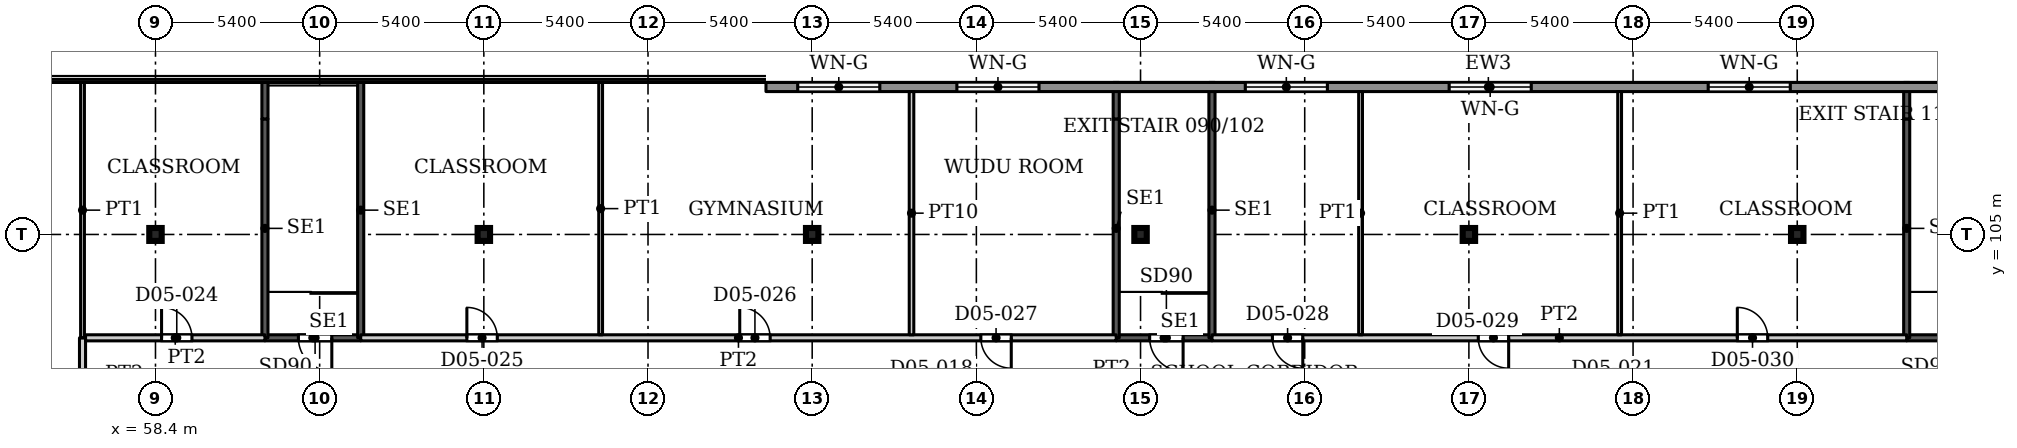
"""IFC4 building model, lengths in metres.
Left out: names, types, materials, properties, quantities, classifications, styles, units other than length and angle.
Written with IfcOpenShell. Run it as: python <this file> out.ifc"""

import sys

from ifc_helpers import new_model, si_unit, direction, frame, frame_2d, origin, origin_2d, place, context, subcontext, project, spatial, rectangle, i_section, extrude, source, transform, mapped, element, fill, save


model = new_model("IFC4")
c1 = context("Model", 3, precision=1e-05, world=origin(), true_north=direction((0.0, 1.0)))
c2 = subcontext(c1, "Body", "Model", "MODEL_VIEW")
j1 = project(units=[si_unit("LENGTHUNIT", "METRE"), si_unit("PLANEANGLEUNIT", "RADIAN")], contexts=[c1])
p1 = place(None, origin())
s1 = spatial("IfcSite", under=j1, at=p1, CompositionType="ELEMENT")
p2 = place(p1, origin())
s2 = spatial("IfcBuilding", under=s1, at=p2, CompositionType="ELEMENT")
p3 = place(p2, frame((0.0, 0.0, 26.0)))
s3 = spatial("IfcBuildingStorey", under=s2, at=p3, CompositionType="ELEMENT", Elevation=26.0)
for number, where, z_axis, x_axis in (
    (1, (58.4, 105.0, 0.0), (0.0, 0.0, 1.0), (1.0, 0.0, 0.0)),
    (2, (69.2, 105.0, 0.0), (0.0, 0.0, 1.0), (1.0, 0.0, 0.0)),
    (3, (80.0, 105.0, 0.0), (0.0, 0.0, 1.0), (1.0, 0.0, 0.0)),
    (4, (90.8, 105.0, 0.0), (0.0, 0.0, 1.0), (1.0, 0.0, 0.0)),
    (5, (101.6, 105.0, 0.0), (0.0, 0.0, 1.0), (1.0, 0.0, 0.0)),
    (6, (112.4, 105.0, 0.0), (0.0, 0.0, 1.0), (1.0, 0.0, 0.0)),
):
    element("IfcColumn", number, at=place(p3, frame(where, z_axis=z_axis, x_axis=x_axis)), inside=s3, PredefinedType="COLUMN", context=c2, shape_type="SweptSolid", body=[
        extrude(i_section(OverallWidth=0.409, OverallDepth=0.425, WebThickness=0.033, FlangeThickness=0.052, FilletRadius=0.013, at=origin_2d()), origin(), (0.0, 0.0, 1.0), 4.5),
    ])
p4 = place(p3, frame((78.48, 109.85, 0.0), z_axis=(0.0, 0.0, 1.0), x_axis=(1.0, 0.0, 0.0)))
e7 = element("IfcWall", 7, at=p4, inside=s3, PredefinedType="SOLIDWALL", context=c2, shape_type="SweptSolid", body=[
    extrude(rectangle(XDim=47.52, YDim=0.3, at=frame_2d((23.76, 0.0))), origin(), (0.0, 0.0, 1.0), 4.25),
])
p5 = place(p4, frame((1.045, 0.0, 2.4)))
e8 = element("IfcOpeningElement", 8, at=p5, cuts=e7, PredefinedType="OPENING", context=c2, shape_type="SweptSolid", body=[
    extrude(rectangle(XDim=2.7, YDim=1.2, at=frame_2d((1.35, 0.6))), frame((0.0, 0.16, 0.0), z_axis=(0.0, -1.0, 0.0), x_axis=(1.0, 0.0, 0.0)), (0.0, 0.0, 1.0), 0.32),
])
p6 = place(p4, frame((6.28, 0.0, 2.4)))
e9 = element("IfcOpeningElement", 9, at=p6, cuts=e7, PredefinedType="OPENING", context=c2, shape_type="SweptSolid", body=[
    extrude(rectangle(XDim=2.7, YDim=1.2, at=frame_2d((1.35, 0.6))), frame((0.0, 0.16, 0.0), z_axis=(0.0, -1.0, 0.0), x_axis=(1.0, 0.0, 0.0)), (0.0, 0.0, 1.0), 0.32),
])
p7 = place(p4, frame((15.765, 0.0, 2.4)))
e10 = element("IfcOpeningElement", 10, at=p7, cuts=e7, PredefinedType="OPENING", context=c2, shape_type="SweptSolid", body=[
    extrude(rectangle(XDim=2.7, YDim=1.2, at=frame_2d((1.35, 0.6))), frame((0.0, 0.16, 0.0), z_axis=(0.0, -1.0, 0.0), x_axis=(1.0, 0.0, 0.0)), (0.0, 0.0, 1.0), 0.32),
])
p8 = place(p4, frame((22.47, 0.0, 2.4)))
e11 = element("IfcOpeningElement", 11, at=p8, cuts=e7, PredefinedType="OPENING", context=c2, shape_type="SweptSolid", body=[
    extrude(rectangle(XDim=2.7, YDim=1.2, at=frame_2d((1.35, 0.6))), frame((0.0, 0.16, 0.0), z_axis=(0.0, -1.0, 0.0), x_axis=(1.0, 0.0, 0.0)), (0.0, 0.0, 1.0), 0.32),
])
p9 = place(p4, frame((30.99, 0.0, 2.4)))
e12 = element("IfcOpeningElement", 12, at=p9, cuts=e7, PredefinedType="OPENING", context=c2, shape_type="SweptSolid", body=[
    extrude(rectangle(XDim=2.7, YDim=1.2, at=frame_2d((1.35, 0.6))), frame((0.0, 0.16, 0.0), z_axis=(0.0, -1.0, 0.0), x_axis=(1.0, 0.0, 0.0)), (0.0, 0.0, 1.0), 0.32),
])
p10 = place(p4, frame((41.545, 0.0, 2.4)))
e13 = element("IfcOpeningElement", 13, at=p10, cuts=e7, PredefinedType="OPENING", context=c2, shape_type="SweptSolid", body=[
    extrude(rectangle(XDim=2.7, YDim=1.2, at=frame_2d((1.35, 0.6))), frame((0.0, 0.16, 0.0), z_axis=(0.0, -1.0, 0.0), x_axis=(1.0, 0.0, 0.0)), (0.0, 0.0, 1.0), 0.32),
])
p11 = place(p3, frame((62.0, 101.6, 0.0), z_axis=(0.0, 0.0, 1.0), x_axis=(1.0, 0.0, 0.0)))
e14 = element("IfcWall", 14, at=p11, inside=s3, PredefinedType="SHEAR", context=c2, shape_type="SweptSolid", body=[
    extrude(rectangle(XDim=3.15, YDim=0.2, at=frame_2d((1.575, 0.0))), origin(), (0.0, 0.0, 1.0), 4.5),
])
p12 = place(p11, frame((1.1, 0.0, 0.0)))
e15 = element("IfcOpeningElement", 15, at=p12, cuts=e14, PredefinedType="OPENING", context=c2, shape_type="SweptSolid", body=[
    extrude(rectangle(XDim=1.1, YDim=2.2, at=frame_2d((0.55, 1.1))), frame((0.0, 0.11, 0.0), z_axis=(0.0, -1.0, 0.0), x_axis=(1.0, 0.0, 0.0)), (0.0, 0.0, 1.0), 0.22),
])
p13 = place(p3, frame((62.0, 101.6, 0.0), z_axis=(0.0, 0.0, 1.0), x_axis=(0.0, 1.0, 0.0)))
e16 = element("IfcWall", 16, at=p13, inside=s3, PredefinedType="SHEAR", context=c2, shape_type="SweptSolid", body=[
    extrude(rectangle(XDim=7.2, YDim=0.2, at=frame_2d((3.6, 0.0))), origin(), (0.0, 0.0, 1.0), 4.5),
])
p14 = place(p3, frame((62.0, 108.8, 0.0), z_axis=(0.0, 0.0, 1.0), x_axis=(0.0, 1.0, 0.0)))
e17 = element("IfcWall", 17, at=p14, inside=s3, PredefinedType="SHEAR", context=c2, shape_type="SweptSolid", body=[
    extrude(rectangle(XDim=1.2, YDim=0.2, at=frame_2d((0.6, 0.0))), origin(), (0.0, 0.0, 1.0), 4.5),
])
p15 = place(p3, frame((65.15, 101.6, 0.0), z_axis=(0.0, 0.0, 1.0), x_axis=(0.0, 1.0, 0.0)))
e18 = element("IfcWall", 18, at=p15, inside=s3, PredefinedType="SHEAR", context=c2, shape_type="SweptSolid", body=[
    extrude(rectangle(XDim=8.4, YDim=0.2, at=frame_2d((4.2, 0.0))), origin(), (0.0, 0.0, 1.0), 4.5),
])
p16 = place(p3, frame((90.0, 101.6, 0.0), z_axis=(0.0, 0.0, 1.0), x_axis=(1.0, 0.0, 0.0)))
e19 = element("IfcWall", 19, at=p16, inside=s3, PredefinedType="SHEAR", context=c2, shape_type="SweptSolid", body=[
    extrude(rectangle(XDim=3.15, YDim=0.2, at=frame_2d((1.575, 0.0))), origin(), (0.0, 0.0, 1.0), 4.5),
])
p17 = place(p16, frame((1.1, 0.0, 0.0)))
e20 = element("IfcOpeningElement", 20, at=p17, cuts=e19, PredefinedType="OPENING", context=c2, shape_type="SweptSolid", body=[
    extrude(rectangle(XDim=1.1, YDim=2.2, at=frame_2d((0.55, 1.1))), frame((0.0, 0.11, 0.0), z_axis=(0.0, -1.0, 0.0), x_axis=(1.0, 0.0, 0.0)), (0.0, 0.0, 1.0), 0.22),
])
p18 = place(p3, frame((90.0, 101.6, 0.0), z_axis=(0.0, 0.0, 1.0), x_axis=(0.0, 1.0, 0.0)))
e21 = element("IfcWall", 21, at=p18, inside=s3, PredefinedType="SHEAR", context=c2, shape_type="SweptSolid", body=[
    extrude(rectangle(XDim=7.2, YDim=0.2, at=frame_2d((3.6, 0.0))), origin(), (0.0, 0.0, 1.0), 4.5),
])
p19 = place(p3, frame((90.0, 108.8, 0.0), z_axis=(0.0, 0.0, 1.0), x_axis=(0.0, 1.0, 0.0)))
e22 = element("IfcWall", 22, at=p19, inside=s3, PredefinedType="SHEAR", context=c2, shape_type="SweptSolid", body=[
    extrude(rectangle(XDim=1.2, YDim=0.2, at=frame_2d((0.6, 0.0))), origin(), (0.0, 0.0, 1.0), 4.5),
])
p20 = place(p3, frame((93.15, 101.6, 0.0), z_axis=(0.0, 0.0, 1.0), x_axis=(0.0, 1.0, 0.0)))
e23 = element("IfcWall", 23, at=p20, inside=s3, PredefinedType="SHEAR", context=c2, shape_type="SweptSolid", body=[
    extrude(rectangle(XDim=8.4, YDim=0.2, at=frame_2d((4.2, 0.0))), origin(), (0.0, 0.0, 1.0), 4.5),
])
p21 = place(p3, frame((116.0, 101.6, 0.0), z_axis=(0.0, 0.0, 1.0), x_axis=(1.0, 0.0, 0.0)))
e24 = element("IfcWall", 24, at=p21, inside=s3, PredefinedType="SHEAR", context=c2, shape_type="SweptSolid", body=[
    extrude(rectangle(XDim=3.15, YDim=0.2, at=frame_2d((1.575, 0.0))), origin(), (0.0, 0.0, 1.0), 4.5),
])
p22 = place(p21, frame((1.1, 0.0, 0.0)))
e25 = element("IfcOpeningElement", 25, at=p22, cuts=e24, PredefinedType="OPENING", context=c2, shape_type="SweptSolid", body=[
    extrude(rectangle(XDim=1.1, YDim=2.2, at=frame_2d((0.55, 1.1))), frame((0.0, 0.11, 0.0), z_axis=(0.0, -1.0, 0.0), x_axis=(1.0, 0.0, 0.0)), (0.0, 0.0, 1.0), 0.22),
])
p23 = place(p3, frame((116.0, 101.6, 0.0), z_axis=(0.0, 0.0, 1.0), x_axis=(0.0, 1.0, 0.0)))
e26 = element("IfcWall", 26, at=p23, inside=s3, PredefinedType="SHEAR", context=c2, shape_type="SweptSolid", body=[
    extrude(rectangle(XDim=7.2, YDim=0.2, at=frame_2d((3.6, 0.0))), origin(), (0.0, 0.0, 1.0), 4.5),
])
p24 = place(p3, frame((116.0, 108.8, 0.0), z_axis=(0.0, 0.0, 1.0), x_axis=(0.0, 1.0, 0.0)))
e27 = element("IfcWall", 27, at=p24, inside=s3, PredefinedType="SHEAR", context=c2, shape_type="SweptSolid", body=[
    extrude(rectangle(XDim=1.2, YDim=0.2, at=frame_2d((0.6, 0.0))), origin(), (0.0, 0.0, 1.0), 4.5),
])
p25 = place(p3, frame((56.0, 99.2, 0.0), z_axis=(0.0, 0.0, 1.0), x_axis=(0.0, 1.0, 0.0)))
e28 = element("IfcWall", 28, at=p25, inside=s3, PredefinedType="PARTITIONING", context=c2, shape_type="SweptSolid", body=[
    extrude(rectangle(XDim=2.4, YDim=0.2, at=frame_2d((1.2, 0.0))), origin(), (0.0, 0.0, 1.0), 4.2),
])
p26 = place(p3, frame((56.0, 101.6, 0.0), z_axis=(0.0, 0.0, 1.0), x_axis=(0.0, 1.0, 0.0)))
e29 = element("IfcWall", 29, at=p26, inside=s3, PredefinedType="PARTITIONING", context=c2, shape_type="SweptSolid", body=[
    extrude(rectangle(XDim=8.4, YDim=0.125, at=frame_2d((4.2, 0.0))), origin(), (0.0, 0.0, 1.0), 4.2),
])
p27 = place(p3, frame((56.1, 101.6, 0.0), z_axis=(0.0, 0.0, 1.0), x_axis=(1.0, 0.0, 0.0)))
e30 = element("IfcWall", 30, at=p27, inside=s3, PredefinedType="PARTITIONING", context=c2, shape_type="SweptSolid", body=[
    extrude(rectangle(XDim=5.9, YDim=0.2, at=frame_2d((2.95, 0.0))), origin(), (0.0, 0.0, 1.0), 4.2),
])
p28 = place(p27, frame((2.5, 0.0, 0.0)))
e31 = element("IfcOpeningElement", 31, at=p28, cuts=e30, PredefinedType="OPENING", context=c2, shape_type="SweptSolid", body=[
    extrude(rectangle(XDim=1.0, YDim=2.1, at=frame_2d((0.5, 1.05))), frame((0.0, 0.11, 0.0), z_axis=(0.0, -1.0, 0.0), x_axis=(1.0, 0.0, 0.0)), (0.0, 0.0, 1.0), 0.22),
])
p29 = place(p3, frame((65.15, 101.6, 0.0), z_axis=(0.0, 0.0, 1.0), x_axis=(1.0, 0.0, 0.0)))
e32 = element("IfcWall", 32, at=p29, inside=s3, PredefinedType="PARTITIONING", context=c2, shape_type="SweptSolid", body=[
    extrude(rectangle(XDim=24.85, YDim=0.2, at=frame_2d((12.425, 0.0))), origin(), (0.0, 0.0, 1.0), 4.2),
])
p30 = place(p29, frame((3.492, 0.0, 0.0)))
e33 = element("IfcOpeningElement", 33, at=p30, cuts=e32, PredefinedType="OPENING", context=c2, shape_type="SweptSolid", body=[
    extrude(rectangle(XDim=1.0, YDim=2.1, at=frame_2d((0.5, 1.05))), frame((0.0, 0.11, 0.0), z_axis=(0.0, -1.0, 0.0), x_axis=(1.0, 0.0, 0.0)), (0.0, 0.0, 1.0), 0.22),
])
p31 = place(p29, frame((12.467, 0.0, 0.0)))
e34 = element("IfcOpeningElement", 34, at=p31, cuts=e32, PredefinedType="OPENING", context=c2, shape_type="SweptSolid", body=[
    extrude(rectangle(XDim=1.0, YDim=2.1, at=frame_2d((0.5, 1.05))), frame((0.0, 0.11, 0.0), z_axis=(0.0, -1.0, 0.0), x_axis=(1.0, 0.0, 0.0)), (0.0, 0.0, 1.0), 0.22),
])
p32 = place(p29, frame((20.398, 0.0, 0.0)))
e35 = element("IfcOpeningElement", 35, at=p32, cuts=e32, PredefinedType="OPENING", context=c2, shape_type="SweptSolid", body=[
    extrude(rectangle(XDim=1.0, YDim=2.1, at=frame_2d((0.5, 1.05))), frame((0.0, 0.11, 0.0), z_axis=(0.0, -1.0, 0.0), x_axis=(1.0, 0.0, 0.0)), (0.0, 0.0, 1.0), 0.22),
])
p33 = place(p3, frame((73.042, 101.7, 0.0), z_axis=(0.0, 0.0, 1.0), x_axis=(0.0, 1.0, 0.0)))
e36 = element("IfcWall", 36, at=p33, inside=s3, PredefinedType="PARTITIONING", context=c2, shape_type="SweptSolid", body=[
    extrude(rectangle(XDim=8.3, YDim=0.125, at=frame_2d((4.15, 0.0))), origin(), (0.0, 0.0, 1.0), 4.2),
])
p34 = place(p3, frame((83.267, 101.7, 0.0), z_axis=(0.0, 0.0, 1.0), x_axis=(0.0, 1.0, 0.0)))
e37 = element("IfcWall", 37, at=p34, inside=s3, PredefinedType="PARTITIONING", context=c2, shape_type="SweptSolid", body=[
    extrude(rectangle(XDim=8.001, YDim=0.15, at=frame_2d((4.0, 0.0))), origin(), (0.0, 0.0, 1.0), 4.2),
])
p35 = place(p3, frame((93.15, 101.6, 0.0), z_axis=(0.0, 0.0, 1.0), x_axis=(1.0, 0.0, 0.0)))
e38 = element("IfcWall", 38, at=p35, inside=s3, PredefinedType="PARTITIONING", context=c2, shape_type="SweptSolid", body=[
    extrude(rectangle(XDim=22.85, YDim=0.2, at=frame_2d((11.425, 0.0))), origin(), (0.0, 0.0, 1.0), 4.2),
])
p36 = place(p35, frame((1.987, 0.0, 0.0)))
e39 = element("IfcOpeningElement", 39, at=p36, cuts=e38, PredefinedType="OPENING", context=c2, shape_type="SweptSolid", body=[
    extrude(rectangle(XDim=1.0, YDim=2.1, at=frame_2d((0.5, 1.05))), frame((0.0, 0.11, 0.0), z_axis=(0.0, -1.0, 0.0), x_axis=(1.0, 0.0, 0.0)), (0.0, 0.0, 1.0), 0.22),
])
p37 = place(p35, frame((8.758, 0.0, 0.0)))
e40 = element("IfcOpeningElement", 40, at=p37, cuts=e38, PredefinedType="OPENING", context=c2, shape_type="SweptSolid", body=[
    extrude(rectangle(XDim=1.0, YDim=2.1, at=frame_2d((0.5, 1.05))), frame((0.0, 0.11, 0.0), z_axis=(0.0, -1.0, 0.0), x_axis=(1.0, 0.0, 0.0)), (0.0, 0.0, 1.0), 0.22),
])
p38 = place(p35, frame((17.279, 0.0, 0.0)))
e41 = element("IfcOpeningElement", 41, at=p38, cuts=e38, PredefinedType="OPENING", context=c2, shape_type="SweptSolid", body=[
    extrude(rectangle(XDim=1.0, YDim=2.1, at=frame_2d((0.5, 1.05))), frame((0.0, 0.11, 0.0), z_axis=(0.0, -1.0, 0.0), x_axis=(1.0, 0.0, 0.0)), (0.0, 0.0, 1.0), 0.22),
])
for number, where, z_axis, x_axis in (
    (42, (98.037, 101.7, 0.0), (0.0, 0.0, 1.0), (0.0, 1.0, 0.0)),
    (43, (106.558, 101.7, 0.0), (0.0, 0.0, 1.0), (0.0, 1.0, 0.0)),
):
    element("IfcWall", number, at=place(p3, frame(where, z_axis=z_axis, x_axis=x_axis)), inside=s3, PredefinedType="PARTITIONING", context=c2, shape_type="SweptSolid", body=[
        extrude(rectangle(XDim=8.001, YDim=0.125, at=frame_2d((4.0, 0.0))), origin(), (0.0, 0.0, 1.0), 4.2),
    ])
m1 = source(origin(), c2, "Body", "SweptSolid", [
    extrude(rectangle(XDim=2.7, YDim=1.2, at=frame_2d((1.35, 0.6))), frame((0.0, 0.03, 0.0), z_axis=(0.0, -1.0, 0.0), x_axis=(1.0, 0.0, 0.0)), (0.0, 0.0, 1.0), 0.06),
])
p39 = place(p5, origin())
e44 = element("IfcWindow", 44, at=p39, inside=s3, PartitioningType="SINGLE_PANEL", PredefinedType="WINDOW", context=c2, shape_type="MappedRepresentation", body=[
    mapped(m1, transform((0.0, 0.0, 0.0), x_axis=(1.0, 0.0, 0.0), y_axis=(0.0, 1.0, 0.0), z_axis=(0.0, 0.0, 1.0), scale=1.0)),
])
fill(e8, e44)
p40 = place(p6, origin())
e45 = element("IfcWindow", 45, at=p40, inside=s3, PartitioningType="SINGLE_PANEL", PredefinedType="WINDOW", context=c2, shape_type="MappedRepresentation", body=[
    mapped(m1, transform((0.0, 0.0, 0.0), x_axis=(1.0, 0.0, 0.0), y_axis=(0.0, 1.0, 0.0), z_axis=(0.0, 0.0, 1.0), scale=1.0)),
])
fill(e9, e45)
p41 = place(p7, origin())
e46 = element("IfcWindow", 46, at=p41, inside=s3, PartitioningType="SINGLE_PANEL", PredefinedType="WINDOW", context=c2, shape_type="MappedRepresentation", body=[
    mapped(m1, transform((0.0, 0.0, 0.0), x_axis=(1.0, 0.0, 0.0), y_axis=(0.0, 1.0, 0.0), z_axis=(0.0, 0.0, 1.0), scale=1.0)),
])
fill(e10, e46)
p42 = place(p8, origin())
e47 = element("IfcWindow", 47, at=p42, inside=s3, PartitioningType="SINGLE_PANEL", PredefinedType="WINDOW", context=c2, shape_type="MappedRepresentation", body=[
    mapped(m1, transform((0.0, 0.0, 0.0), x_axis=(1.0, 0.0, 0.0), y_axis=(0.0, 1.0, 0.0), z_axis=(0.0, 0.0, 1.0), scale=1.0)),
])
fill(e11, e47)
p43 = place(p9, origin())
e48 = element("IfcWindow", 48, at=p43, inside=s3, PartitioningType="SINGLE_PANEL", PredefinedType="WINDOW", context=c2, shape_type="MappedRepresentation", body=[
    mapped(m1, transform((0.0, 0.0, 0.0), x_axis=(1.0, 0.0, 0.0), y_axis=(0.0, 1.0, 0.0), z_axis=(0.0, 0.0, 1.0), scale=1.0)),
])
fill(e12, e48)
m2 = source(origin(), c2, "Body", "SweptSolid", [
    extrude(rectangle(XDim=1.1, YDim=2.2, at=frame_2d((0.55, 1.1))), frame((0.0, 0.025, 0.0), z_axis=(0.0, -1.0, 0.0), x_axis=(1.0, 0.0, 0.0)), (0.0, 0.0, 1.0), 0.05),
])
p44 = place(p12, origin())
e49 = element("IfcDoor", 49, at=p44, inside=s3, OperationType="SINGLE_SWING_RIGHT", PredefinedType="DOOR", context=c2, shape_type="MappedRepresentation", body=[
    mapped(m2, transform((0.0, 0.0, 0.0), x_axis=(1.0, 0.0, 0.0), y_axis=(0.0, 1.0, 0.0), z_axis=(0.0, 0.0, 1.0), scale=1.0)),
])
fill(e15, e49)
p45 = place(p17, origin())
e50 = element("IfcDoor", 50, at=p45, inside=s3, OperationType="SINGLE_SWING_RIGHT", PredefinedType="DOOR", context=c2, shape_type="MappedRepresentation", body=[
    mapped(m2, transform((0.0, 0.0, 0.0), x_axis=(1.0, 0.0, 0.0), y_axis=(0.0, 1.0, 0.0), z_axis=(0.0, 0.0, 1.0), scale=1.0)),
])
fill(e20, e50)
m3 = source(origin(), c2, "Body", "SweptSolid", [
    extrude(rectangle(XDim=1.0, YDim=2.1, at=frame_2d((0.5, 1.05))), frame((0.0, 0.025, 0.0), z_axis=(0.0, -1.0, 0.0), x_axis=(1.0, 0.0, 0.0)), (0.0, 0.0, 1.0), 0.05),
])
p46 = place(p28, origin())
e51 = element("IfcDoor", 51, at=p46, inside=s3, OperationType="SINGLE_SWING_LEFT", PredefinedType="DOOR", context=c2, shape_type="MappedRepresentation", body=[
    mapped(m3, transform((0.0, 0.0, 0.0), x_axis=(1.0, 0.0, 0.0), y_axis=(0.0, 1.0, 0.0), z_axis=(0.0, 0.0, 1.0), scale=1.0)),
])
fill(e31, e51)
p47 = place(p30, origin())
e52 = element("IfcDoor", 52, at=p47, inside=s3, OperationType="SINGLE_SWING_LEFT", PredefinedType="DOOR", context=c2, shape_type="MappedRepresentation", body=[
    mapped(m3, transform((0.0, 0.0, 0.0), x_axis=(1.0, 0.0, 0.0), y_axis=(0.0, 1.0, 0.0), z_axis=(0.0, 0.0, 1.0), scale=1.0)),
])
fill(e33, e52)
p48 = place(p31, origin())
e53 = element("IfcDoor", 53, at=p48, inside=s3, OperationType="SINGLE_SWING_LEFT", PredefinedType="DOOR", context=c2, shape_type="MappedRepresentation", body=[
    mapped(m3, transform((0.0, 0.0, 0.0), x_axis=(1.0, 0.0, 0.0), y_axis=(0.0, 1.0, 0.0), z_axis=(0.0, 0.0, 1.0), scale=1.0)),
])
fill(e34, e53)
p49 = place(p32, origin())
e54 = element("IfcDoor", 54, at=p49, inside=s3, OperationType="SINGLE_SWING_RIGHT", PredefinedType="DOOR", context=c2, shape_type="MappedRepresentation", body=[
    mapped(m3, transform((0.0, 0.0, 0.0), x_axis=(1.0, 0.0, 0.0), y_axis=(0.0, 1.0, 0.0), z_axis=(0.0, 0.0, 1.0), scale=1.0)),
])
fill(e35, e54)
p50 = place(p36, origin())
e55 = element("IfcDoor", 55, at=p50, inside=s3, OperationType="SINGLE_SWING_RIGHT", PredefinedType="DOOR", context=c2, shape_type="MappedRepresentation", body=[
    mapped(m3, transform((0.0, 0.0, 0.0), x_axis=(1.0, 0.0, 0.0), y_axis=(0.0, 1.0, 0.0), z_axis=(0.0, 0.0, 1.0), scale=1.0)),
])
fill(e39, e55)
p51 = place(p37, origin())
e56 = element("IfcDoor", 56, at=p51, inside=s3, OperationType="SINGLE_SWING_RIGHT", PredefinedType="DOOR", context=c2, shape_type="MappedRepresentation", body=[
    mapped(m3, transform((0.0, 0.0, 0.0), x_axis=(1.0, 0.0, 0.0), y_axis=(0.0, 1.0, 0.0), z_axis=(0.0, 0.0, 1.0), scale=1.0)),
])
fill(e40, e56)
p52 = place(p38, origin())
e57 = element("IfcDoor", 57, at=p52, inside=s3, OperationType="SINGLE_SWING_LEFT", PredefinedType="DOOR", context=c2, shape_type="MappedRepresentation", body=[
    mapped(m3, transform((0.0, 0.0, 0.0), x_axis=(1.0, 0.0, 0.0), y_axis=(0.0, 1.0, 0.0), z_axis=(0.0, 0.0, 1.0), scale=1.0)),
])
fill(e41, e57)
save(model, sys.argv[1])
